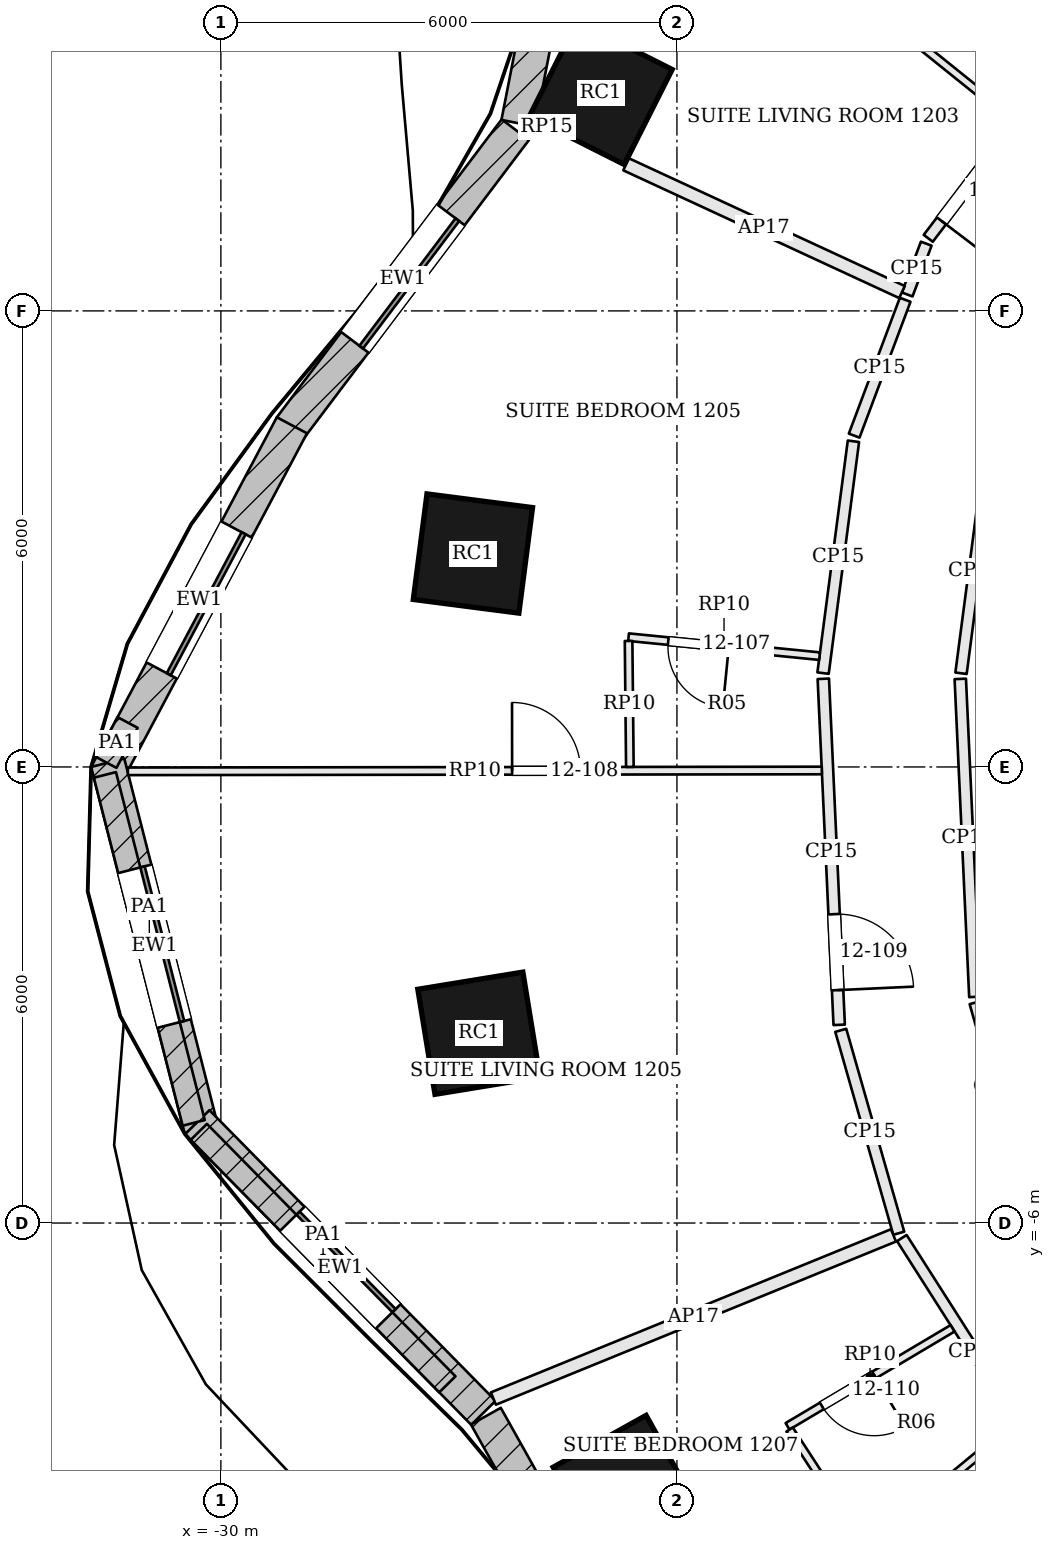
"""IFC4 building model, lengths in metres.
Left out: names, types, materials, properties, quantities, classifications, styles, units other than length and angle.
Written with IfcOpenShell. Run it as: python <this file> out.ifc"""

import sys

from ifc_helpers import new_model, si_unit, direction, frame, frame_2d, origin, origin_2d, place, context, subcontext, project, spatial, rectangle, extrude, element, fill, save


model = new_model("IFC4")
c1 = context("Model", 3, precision=1e-05, world=origin(), true_north=direction((0.0, 1.0)))
c2 = subcontext(c1, "Body", "Model", "MODEL_VIEW")
j1 = project(units=[si_unit("LENGTHUNIT", "METRE"), si_unit("PLANEANGLEUNIT", "RADIAN")], contexts=[c1])
p1 = place(None, origin())
s1 = spatial("IfcSite", under=j1, at=p1, CompositionType="ELEMENT")
p2 = place(p1, origin())
s2 = spatial("IfcBuilding", under=s1, at=p2, CompositionType="ELEMENT")
p3 = place(p2, frame((0.0, 0.0, 59.1)))
s3 = spatial("IfcBuildingStorey", under=s2, at=p3, CompositionType="ELEMENT", Elevation=59.1)
for number, where, z_axis, x_axis in (
    (1, (-25.003, 8.866, 0.0), (0.0, 0.0, 1.0), (-0.45, -0.893, 0.0)),
    (2, (-26.684, 2.808, 0.0), (0.0, 0.0, 1.0), (-0.128, -0.992, 0.0)),
    (3, (-26.605, -3.503, 0.0), (0.0, 0.0, 1.0), (0.161, -0.987, 0.0)),
    (4, (-24.676, -9.483, 0.0), (0.0, 0.0, 1.0), (0.487, -0.873, 0.0)),
):
    element("IfcColumn", number, at=place(p3, frame(where, z_axis=z_axis, x_axis=x_axis)), inside=s3, PredefinedType="COLUMN", context=c2, shape_type="SweptSolid", body=[
        extrude(rectangle(XDim=1.4, YDim=1.4, at=origin_2d()), origin(), (0.0, 0.0, 1.0), 3.6),
    ])
p4 = place(p3, frame((-25.216, 12.936, 0.0), z_axis=(0.0, 0.0, 1.0), x_axis=(-0.191564556994, -0.981480015336, 0.0)))
e5 = element("IfcWall", 5, at=p4, inside=s3, PredefinedType="SOLIDWALL", context=c2, shape_type="SweptSolid", body=[
    extrude(rectangle(XDim=4.551, YDim=0.45, at=frame_2d((2.275, 0.0))), origin(), (0.0, 0.0, 1.0), 3.4),
])
p5 = place(p4, frame((1.226, 0.0, 0.9)))
e6 = element("IfcOpeningElement", 6, at=p5, cuts=e5, PredefinedType="OPENING", context=c2, shape_type="SweptSolid", body=[
    extrude(rectangle(XDim=2.1, YDim=2.0, at=frame_2d((1.05, 1.0))), frame((0.0, 0.235, 0.0), z_axis=(0.0, -1.0, 0.0), x_axis=(1.0, 0.0, 0.0)), (0.0, 0.0, 1.0), 0.47),
])
p6 = place(p3, frame((-26.126, 8.384, 0.0), z_axis=(0.0, 0.0, 1.0), x_axis=(-0.602408101465, -0.798188248028, 0.0)))
e7 = element("IfcWall", 7, at=p6, inside=s3, PredefinedType="SOLIDWALL", context=c2, shape_type="SweptSolid", body=[
    extrude(rectangle(XDim=4.909, YDim=0.45, at=frame_2d((2.455, 0.0))), origin(), (0.0, 0.0, 1.0), 3.4),
])
p7 = place(p6, frame((1.405, 0.0, 0.9)))
e8 = element("IfcOpeningElement", 8, at=p7, cuts=e7, PredefinedType="OPENING", context=c2, shape_type="SweptSolid", body=[
    extrude(rectangle(XDim=2.1, YDim=2.0, at=frame_2d((1.05, 1.0))), frame((0.0, 0.235, 0.0), z_axis=(0.0, -1.0, 0.0), x_axis=(1.0, 0.0, 0.0)), (0.0, 0.0, 1.0), 0.47),
])
p8 = place(p3, frame((-29.065, 4.495, 0.0), z_axis=(0.0, 0.0, 1.0), x_axis=(-0.469010051546, -0.883192828067, 0.0)))
e9 = element("IfcWall", 9, at=p8, inside=s3, PredefinedType="SOLIDWALL", context=c2, shape_type="SweptSolid", body=[
    extrude(rectangle(XDim=5.206, YDim=0.45, at=frame_2d((2.603, 0.0))), origin(), (0.0, 0.0, 1.0), 3.4),
])
p9 = place(p8, frame((1.553, 0.0, 0.9)))
e10 = element("IfcOpeningElement", 10, at=p9, cuts=e9, PredefinedType="OPENING", context=c2, shape_type="SweptSolid", body=[
    extrude(rectangle(XDim=2.1, YDim=2.0, at=frame_2d((1.05, 1.0))), frame((0.0, 0.235, 0.0), z_axis=(0.0, -1.0, 0.0), x_axis=(1.0, 0.0, 0.0)), (0.0, 0.0, 1.0), 0.47),
])
p10 = place(p3, frame((-31.489, 0.056, 0.0), z_axis=(0.0, 0.0, 1.0), x_axis=(0.247283399528, -0.968943197674, 0.0)))
e11 = element("IfcWall", 11, at=p10, inside=s3, PredefinedType="SOLIDWALL", context=c2, shape_type="SweptSolid", body=[
    extrude(rectangle(XDim=4.982, YDim=0.45, at=frame_2d((2.491, 0.0))), origin(), (0.0, 0.0, 1.0), 3.4),
])
p11 = place(p10, frame((1.441, 0.0, 0.9)))
e12 = element("IfcOpeningElement", 12, at=p11, cuts=e11, PredefinedType="OPENING", context=c2, shape_type="SweptSolid", body=[
    extrude(rectangle(XDim=2.1, YDim=2.0, at=frame_2d((1.05, 1.0))), frame((0.0, 0.235, 0.0), z_axis=(0.0, -1.0, 0.0), x_axis=(1.0, 0.0, 0.0)), (0.0, 0.0, 1.0), 0.47),
])
p12 = place(p3, frame((-30.311, -4.673, 0.0), z_axis=(0.0, 0.0, 1.0), x_axis=(0.701580441607, -0.712590263724, 0.0)))
e13 = element("IfcWall", 13, at=p12, inside=s3, PredefinedType="SOLIDWALL", context=c2, shape_type="SweptSolid", body=[
    extrude(rectangle(XDim=5.366, YDim=0.45, at=frame_2d((2.683, 0.0))), origin(), (0.0, 0.0, 1.0), 3.4),
])
p13 = place(p12, frame((1.783, 0.0, 0.9)))
e14 = element("IfcOpeningElement", 14, at=p13, cuts=e13, PredefinedType="OPENING", context=c2, shape_type="SweptSolid", body=[
    extrude(rectangle(XDim=1.8, YDim=2.0, at=frame_2d((0.9, 1.0))), frame((0.0, 0.235, 0.0), z_axis=(0.0, -1.0, 0.0), x_axis=(1.0, 0.0, 0.0)), (0.0, 0.0, 1.0), 0.47),
])
p14 = place(p3, frame((-26.514, -8.541, 0.0), z_axis=(0.0, 0.0, 1.0), x_axis=(0.488504028898, -0.87256163894, 0.0)))
e15 = element("IfcWall", 15, at=p14, inside=s3, PredefinedType="SOLIDWALL", context=c2, shape_type="SweptSolid", body=[
    extrude(rectangle(XDim=4.416, YDim=0.45, at=frame_2d((2.208, 0.0))), origin(), (0.0, 0.0, 1.0), 3.4),
])
p15 = place(p14, frame((1.158, 0.0, 0.9)))
e16 = element("IfcOpeningElement", 16, at=p15, cuts=e15, PredefinedType="OPENING", context=c2, shape_type="SweptSolid", body=[
    extrude(rectangle(XDim=2.1, YDim=2.0, at=frame_2d((1.05, 1.0))), frame((0.0, 0.235, 0.0), z_axis=(0.0, -1.0, 0.0), x_axis=(1.0, 0.0, 0.0)), (0.0, 0.0, 1.0), 0.47),
])
p16 = place(p3, frame((-31.227, 0.585, 3.6), z_axis=(0.0, 0.0, 1.0), x_axis=(-0.469205161074, -0.883089189619, 0.0)))
e17 = element("IfcWall", 17, at=p16, inside=s3, PredefinedType="PARAPET", context=c2, shape_type="SweptSolid", body=[
    extrude(rectangle(XDim=0.596, YDim=0.3, at=frame_2d((0.298, 0.0))), origin(), (0.0, 0.0, 1.0), 1.1),
])
p17 = place(p3, frame((-31.526, -0.104, 3.6), z_axis=(0.0, 0.0, 1.0), x_axis=(0.247310993439, -0.96893615503, 0.0)))
e18 = element("IfcWall", 18, at=p17, inside=s3, PredefinedType="PARAPET", context=c2, shape_type="SweptSolid", body=[
    extrude(rectangle(XDim=4.725, YDim=0.3, at=frame_2d((2.362, 0.0))), origin(), (0.0, 0.0, 1.0), 1.1),
])
p18 = place(p3, frame((-30.29, -4.801, 3.6), z_axis=(0.0, 0.0, 1.0), x_axis=(0.701637806996, -0.712533780107, 0.0)))
e19 = element("IfcWall", 19, at=p18, inside=s3, PredefinedType="PARAPET", context=c2, shape_type="SweptSolid", body=[
    extrude(rectangle(XDim=4.661, YDim=0.3, at=frame_2d((2.33, 0.0))), origin(), (0.0, 0.0, 1.0), 1.1),
])
p19 = place(p3, frame((-18.523, 9.811, 0.0), z_axis=(0.0, 0.0, 1.0), x_axis=(-0.605040130963, -0.796194976073, 0.0)))
e20 = element("IfcWall", 20, at=p19, inside=s3, PredefinedType="PARTITIONING", context=c2, shape_type="SweptSolid", body=[
    extrude(rectangle(XDim=3.588, YDim=0.15, at=frame_2d((1.794, 0.0))), origin(), (0.0, 0.0, 1.0), 2.68),
])
p20 = place(p19, frame((2.3, 0.0, 0.0)))
e21 = element("IfcOpeningElement", 21, at=p20, cuts=e20, PredefinedType="OPENING", context=c2, shape_type="SweptSolid", body=[
    extrude(rectangle(XDim=1.0, YDim=2.1, at=frame_2d((0.5, 1.05))), frame((0.0, 0.085, 0.0), z_axis=(0.0, -1.0, 0.0), x_axis=(1.0, 0.0, 0.0)), (0.0, 0.0, 1.0), 0.17),
])
p21 = place(p3, frame((-20.72, 6.885, 0.0), z_axis=(0.0, 0.0, 1.0), x_axis=(-0.351610674972, -0.936146320425, 0.0)))
e22 = element("IfcWall", 22, at=p21, inside=s3, PredefinedType="PARTITIONING", context=c2, shape_type="SweptSolid", body=[
    extrude(rectangle(XDim=0.714, YDim=0.15, at=frame_2d((0.357, 0.0))), origin(), (0.0, 0.0, 1.0), 2.68),
])
p22 = place(p3, frame((-25.857, 8.479, 0.0), z_axis=(0.0, 0.0, 1.0), x_axis=(0.907339741323, -0.420398137265, 0.0)))
e23 = element("IfcWall", 23, at=p22, inside=s3, PredefinedType="PARTITIONING", context=c2, shape_type="SweptSolid", body=[
    extrude(rectangle(XDim=0.312, YDim=0.15, at=frame_2d((0.156, 0.0))), origin(), (0.0, 0.0, 1.0), 3.4),
])
p23 = place(p3, frame((-24.669, 7.929, 0.0), z_axis=(0.0, 0.0, 1.0), x_axis=(0.907438898331, -0.420184061807, 0.0)))
e24 = element("IfcWall", 24, at=p23, inside=s3, PredefinedType="PARTITIONING", context=c2, shape_type="SweptSolid", body=[
    extrude(rectangle(XDim=4.0, YDim=0.175, at=frame_2d((2.0, 0.0))), origin(), (0.0, 0.0, 1.0), 2.68),
])
p24 = place(p3, frame((-20.997, 6.146, 0.0), z_axis=(0.0, 0.0, 1.0), x_axis=(-0.35150189194, -0.936187171437, 0.0)))
e25 = element("IfcWall", 25, at=p24, inside=s3, PredefinedType="PARTITIONING", context=c2, shape_type="SweptSolid", body=[
    extrude(rectangle(XDim=1.909, YDim=0.15, at=frame_2d((0.954, 0.0))), origin(), (0.0, 0.0, 1.0), 2.68),
])
p25 = place(p3, frame((-21.678, 4.285, 0.0), z_axis=(0.0, 0.0, 1.0), x_axis=(-0.129922755307, -0.991524118543, 0.0)))
e26 = element("IfcWall", 26, at=p25, inside=s3, PredefinedType="PARTITIONING", context=c2, shape_type="SweptSolid", body=[
    extrude(rectangle(XDim=3.076, YDim=0.15, at=frame_2d((1.538, 0.0))), origin(), (0.0, 0.0, 1.0), 2.68),
])
p26 = place(p3, frame((-22.074, 1.16, 0.0), z_axis=(0.0, 0.0, 1.0), x_axis=(0.045857215204, -0.99894800456, 0.0)))
e27 = element("IfcWall", 27, at=p26, inside=s3, PredefinedType="PARTITIONING", context=c2, shape_type="SweptSolid", body=[
    extrude(rectangle(XDim=4.557, YDim=0.15, at=frame_2d((2.279, 0.0))), origin(), (0.0, 0.0, 1.0), 2.68),
])
p27 = place(p26, frame((3.1, 0.0, 0.0)))
e28 = element("IfcOpeningElement", 28, at=p27, cuts=e27, PredefinedType="OPENING", context=c2, shape_type="SweptSolid", body=[
    extrude(rectangle(XDim=1.0, YDim=2.1, at=frame_2d((0.5, 1.05))), frame((0.0, 0.085, 0.0), z_axis=(0.0, -1.0, 0.0), x_axis=(1.0, 0.0, 0.0)), (0.0, 0.0, 1.0), 0.17),
])
p28 = place(p3, frame((-21.845, -3.465, 0.0), z_axis=(0.0, 0.0, 1.0), x_axis=(0.274802426954, -0.961500715621, 0.0)))
e29 = element("IfcWall", 29, at=p28, inside=s3, PredefinedType="PARTITIONING", context=c2, shape_type="SweptSolid", body=[
    extrude(rectangle(XDim=2.776, YDim=0.15, at=frame_2d((1.388, 0.0))), origin(), (0.0, 0.0, 1.0), 2.68),
])
p29 = place(p3, frame((-26.415, -8.309, 0.0), z_axis=(0.0, 0.0, 1.0), x_axis=(0.925952792173, 0.377639281149, 0.0)))
e30 = element("IfcWall", 30, at=p29, inside=s3, PredefinedType="PARTITIONING", context=c2, shape_type="SweptSolid", body=[
    extrude(rectangle(XDim=5.685, YDim=0.175, at=frame_2d((2.842, 0.0))), origin(), (0.0, 0.0, 1.0), 2.68),
])
p30 = place(p3, frame((-21.042, -6.198, 0.0), z_axis=(0.0, 0.0, 1.0), x_axis=(0.537471214522, -0.843282096075, 0.0)))
e31 = element("IfcWall", 31, at=p30, inside=s3, PredefinedType="PARTITIONING", context=c2, shape_type="SweptSolid", body=[
    extrude(rectangle(XDim=3.552, YDim=0.15, at=frame_2d((1.776, 0.0))), origin(), (0.0, 0.0, 1.0), 2.68),
])
p31 = place(p3, frame((-19.443, -5.319, 0.0), z_axis=(0.0, 0.0, 1.0), x_axis=(-0.274791002319, 0.961503980774, 0.0)))
e32 = element("IfcWall", 32, at=p31, inside=s3, PredefinedType="PARTITIONING", context=c2, shape_type="SweptSolid", body=[
    extrude(rectangle(XDim=2.307, YDim=0.15, at=frame_2d((1.154, 0.0))), origin(), (0.0, 0.0, 1.0), 2.68),
])
p32 = place(p3, frame((-20.08, -3.025, 0.0), z_axis=(0.0, 0.0, 1.0), x_axis=(-0.04581750387, 0.998949826738, 0.0)))
e33 = element("IfcWall", 33, at=p32, inside=s3, PredefinedType="PARTITIONING", context=c2, shape_type="SweptSolid", body=[
    extrude(rectangle(XDim=4.188, YDim=0.15, at=frame_2d((2.094, 0.0))), origin(), (0.0, 0.0, 1.0), 2.68),
])
p33 = place(p3, frame((-20.262, 1.233, 0.0), z_axis=(0.0, 0.0, 1.0), x_axis=(0.129897568593, 0.991527418518, 0.0)))
e34 = element("IfcWall", 34, at=p33, inside=s3, PredefinedType="PARTITIONING", context=c2, shape_type="SweptSolid", body=[
    extrude(rectangle(XDim=2.71, YDim=0.15, at=frame_2d((1.355, 0.0))), origin(), (0.0, 0.0, 1.0), 2.68),
])
p34 = place(p3, frame((-24.996, 12.871, 0.0), z_axis=(0.0, 0.0, 1.0), x_axis=(0.779371961482, -0.626561525835, 0.0)))
e35 = element("IfcWall", 35, at=p34, inside=s3, PredefinedType="PARTITIONING", context=c2, shape_type="SweptSolid", body=[
    extrude(rectangle(XDim=6.932, YDim=0.1, at=frame_2d((3.466, 0.0))), origin(), (0.0, 0.0, 1.0), 2.898),
])
p35 = place(p34, frame((2.857, 0.0, 0.0)))
e36 = element("IfcOpeningElement", 36, at=p35, cuts=e35, PredefinedType="OPENING", context=c2, shape_type="SweptSolid", body=[
    extrude(rectangle(XDim=0.9, YDim=2.4, at=frame_2d((0.45, 1.2))), frame((0.0, 0.06, 0.0), z_axis=(0.0, -1.0, 0.0), x_axis=(1.0, 0.0, 0.0)), (0.0, 0.0, 1.0), 0.12),
])
p36 = place(p3, frame((-31.223, -0.057, 0.0), z_axis=(0.0, 0.0, 1.0), x_axis=(0.999999275952, 0.001203368563, 0.0)))
e37 = element("IfcWall", 37, at=p36, inside=s3, PredefinedType="PARTITIONING", context=c2, shape_type="SweptSolid", body=[
    extrude(rectangle(XDim=9.13, YDim=0.1, at=frame_2d((4.565, 0.0))), origin(), (0.0, 0.0, 1.0), 2.898),
])
p37 = place(p36, frame((5.055, 0.0, 0.0)))
e38 = element("IfcOpeningElement", 38, at=p37, cuts=e37, PredefinedType="OPENING", context=c2, shape_type="SweptSolid", body=[
    extrude(rectangle(XDim=0.9, YDim=2.4, at=frame_2d((0.45, 1.2))), frame((0.0, 0.06, 0.0), z_axis=(0.0, -1.0, 0.0), x_axis=(1.0, 0.0, 0.0)), (0.0, 0.0, 1.0), 0.12),
])
p38 = place(p3, frame((-22.124, 1.458, 0.0), z_axis=(0.0, 0.0, 1.0), x_axis=(-0.995087791944, 0.098996395507, 0.0)))
e39 = element("IfcWall", 39, at=p38, inside=s3, PredefinedType="PARTITIONING", context=c2, shape_type="SweptSolid", body=[
    extrude(rectangle(XDim=2.525, YDim=0.1, at=frame_2d((1.263, 0.0))), origin(), (0.0, 0.0, 1.0), 2.898),
])
p39 = place(p38, frame((1.2, 0.0, 0.0)))
e40 = element("IfcOpeningElement", 40, at=p39, cuts=e39, PredefinedType="OPENING", context=c2, shape_type="SweptSolid", body=[
    extrude(rectangle(XDim=0.8, YDim=2.1, at=frame_2d((0.4, 1.05))), frame((0.0, 0.06, 0.0), z_axis=(0.0, -1.0, 0.0), x_axis=(1.0, 0.0, 0.0)), (0.0, 0.0, 1.0), 0.12),
])
p40 = place(p3, frame((-24.636, 1.658, 0.0), z_axis=(0.0, 0.0, 1.0), x_axis=(0.010017175637, -0.999949826837, 0.0)))
e41 = element("IfcWall", 41, at=p40, inside=s3, PredefinedType="PARTITIONING", context=c2, shape_type="SweptSolid", body=[
    extrude(rectangle(XDim=1.657, YDim=0.1, at=frame_2d((0.829, 0.0))), origin(), (0.0, 0.0, 1.0), 2.898),
])
p41 = place(p3, frame((-24.11, -12.42, 0.0), z_axis=(0.0, 0.0, 1.0), x_axis=(0.770727693234, 0.637164674855, 0.0)))
e42 = element("IfcWall", 42, at=p41, inside=s3, PredefinedType="PARTITIONING", context=c2, shape_type="SweptSolid", body=[
    extrude(rectangle(XDim=5.902, YDim=0.1, at=frame_2d((2.951, 0.0))), origin(), (0.0, 0.0, 1.0), 2.898),
])
p42 = place(p41, frame((1.827, 0.0, 0.0)))
e43 = element("IfcOpeningElement", 43, at=p42, cuts=e42, PredefinedType="OPENING", context=c2, shape_type="SweptSolid", body=[
    extrude(rectangle(XDim=0.9, YDim=2.4, at=frame_2d((0.45, 1.2))), frame((0.0, 0.06, 0.0), z_axis=(0.0, -1.0, 0.0), x_axis=(1.0, 0.0, 0.0)), (0.0, 0.0, 1.0), 0.12),
])
p43 = place(p3, frame((-20.374, -7.385, 0.0), z_axis=(0.0, 0.0, 1.0), x_axis=(-0.859864028729, -0.510523116124, 0.0)))
e44 = element("IfcWall", 44, at=p43, inside=s3, PredefinedType="PARTITIONING", context=c2, shape_type="SweptSolid", body=[
    extrude(rectangle(XDim=2.525, YDim=0.1, at=frame_2d((1.262, 0.0))), origin(), (0.0, 0.0, 1.0), 2.898),
])
p44 = place(p43, frame((1.2, 0.0, 0.0)))
e45 = element("IfcOpeningElement", 45, at=p44, cuts=e44, PredefinedType="OPENING", context=c2, shape_type="SweptSolid", body=[
    extrude(rectangle(XDim=0.8, YDim=2.1, at=frame_2d((0.4, 1.05))), frame((0.0, 0.06, 0.0), z_axis=(0.0, -1.0, 0.0), x_axis=(1.0, 0.0, 0.0)), (0.0, 0.0, 1.0), 0.12),
])
p45 = place(p3, frame((-22.518, -8.716, 0.0), z_axis=(0.0, 0.0, 1.0), x_axis=(0.545759443789, -0.837941901038, 0.0)))
e46 = element("IfcWall", 46, at=p45, inside=s3, PredefinedType="PARTITIONING", context=c2, shape_type="SweptSolid", body=[
    extrude(rectangle(XDim=1.802, YDim=0.1, at=frame_2d((0.901, 0.0))), origin(), (0.0, 0.0, 1.0), 2.898),
])
p46 = place(p7, origin())
e47 = element("IfcWindow", 47, at=p46, inside=s3, PartitioningType="SINGLE_PANEL", PredefinedType="WINDOW", context=c2, shape_type="SweptSolid", body=[
    extrude(rectangle(XDim=2.1, YDim=2.0, at=frame_2d((1.05, 1.0))), frame((0.0, 0.135, 0.0), z_axis=(0.0, -1.0, 0.0), x_axis=(1.0, 0.0, 0.0)), (0.0, 0.0, 1.0), 0.06),
])
fill(e8, e47)
p47 = place(p9, origin())
e48 = element("IfcWindow", 48, at=p47, inside=s3, PartitioningType="SINGLE_PANEL", PredefinedType="WINDOW", context=c2, shape_type="SweptSolid", body=[
    extrude(rectangle(XDim=2.1, YDim=2.0, at=frame_2d((1.05, 1.0))), frame((0.0, 0.135, 0.0), z_axis=(0.0, -1.0, 0.0), x_axis=(1.0, 0.0, 0.0)), (0.0, 0.0, 1.0), 0.06),
])
fill(e10, e48)
p48 = place(p11, origin())
e49 = element("IfcWindow", 49, at=p48, inside=s3, PartitioningType="SINGLE_PANEL", PredefinedType="WINDOW", context=c2, shape_type="SweptSolid", body=[
    extrude(rectangle(XDim=2.1, YDim=2.0, at=frame_2d((1.05, 1.0))), frame((0.0, 0.135, 0.0), z_axis=(0.0, -1.0, 0.0), x_axis=(1.0, 0.0, 0.0)), (0.0, 0.0, 1.0), 0.06),
])
fill(e12, e49)
p49 = place(p13, origin())
e50 = element("IfcWindow", 50, at=p49, inside=s3, PartitioningType="SINGLE_PANEL", PredefinedType="WINDOW", context=c2, shape_type="SweptSolid", body=[
    extrude(rectangle(XDim=1.8, YDim=2.0, at=frame_2d((0.9, 1.0))), frame((0.0, 0.135, 0.0), z_axis=(0.0, -1.0, 0.0), x_axis=(1.0, 0.0, 0.0)), (0.0, 0.0, 1.0), 0.06),
])
fill(e14, e50)
p50 = place(p20, origin())
e51 = element("IfcDoor", 51, at=p50, inside=s3, OperationType="SINGLE_SWING_RIGHT", PredefinedType="DOOR", context=c2, shape_type="SweptSolid", body=[
    extrude(rectangle(XDim=1.0, YDim=2.1, at=frame_2d((0.5, 1.05))), frame((0.0, 0.025, 0.0), z_axis=(0.0, -1.0, 0.0), x_axis=(1.0, 0.0, 0.0)), (0.0, 0.0, 1.0), 0.05),
])
fill(e21, e51)
p51 = place(p39, origin())
e52 = element("IfcDoor", 52, at=p51, inside=s3, OperationType="SINGLE_SWING_LEFT", PredefinedType="DOOR", context=c2, shape_type="SweptSolid", body=[
    extrude(rectangle(XDim=0.8, YDim=2.1, at=frame_2d((0.4, 1.05))), frame((0.0, 0.025, 0.0), z_axis=(0.0, -1.0, 0.0), x_axis=(1.0, 0.0, 0.0)), (0.0, 0.0, 1.0), 0.05),
])
fill(e40, e52)
p52 = place(p37, origin())
e53 = element("IfcDoor", 53, at=p52, inside=s3, OperationType="SINGLE_SWING_LEFT", PredefinedType="DOOR", context=c2, shape_type="SweptSolid", body=[
    extrude(rectangle(XDim=0.9, YDim=2.4, at=frame_2d((0.45, 1.2))), frame((0.0, 0.025, 0.0), z_axis=(0.0, -1.0, 0.0), x_axis=(1.0, 0.0, 0.0)), (0.0, 0.0, 1.0), 0.05),
])
fill(e38, e53)
p53 = place(p27, origin())
e54 = element("IfcDoor", 54, at=p53, inside=s3, OperationType="SINGLE_SWING_RIGHT", PredefinedType="DOOR", context=c2, shape_type="SweptSolid", body=[
    extrude(rectangle(XDim=1.0, YDim=2.1, at=frame_2d((0.5, 1.05))), frame((0.0, 0.025, 0.0), z_axis=(0.0, -1.0, 0.0), x_axis=(1.0, 0.0, 0.0)), (0.0, 0.0, 1.0), 0.05),
])
fill(e28, e54)
p54 = place(p44, origin())
e55 = element("IfcDoor", 55, at=p54, inside=s3, OperationType="SINGLE_SWING_LEFT", PredefinedType="DOOR", context=c2, shape_type="SweptSolid", body=[
    extrude(rectangle(XDim=0.8, YDim=2.1, at=frame_2d((0.4, 1.05))), frame((0.0, 0.025, 0.0), z_axis=(0.0, -1.0, 0.0), x_axis=(1.0, 0.0, 0.0)), (0.0, 0.0, 1.0), 0.05),
])
fill(e45, e55)
save(model, sys.argv[1])
